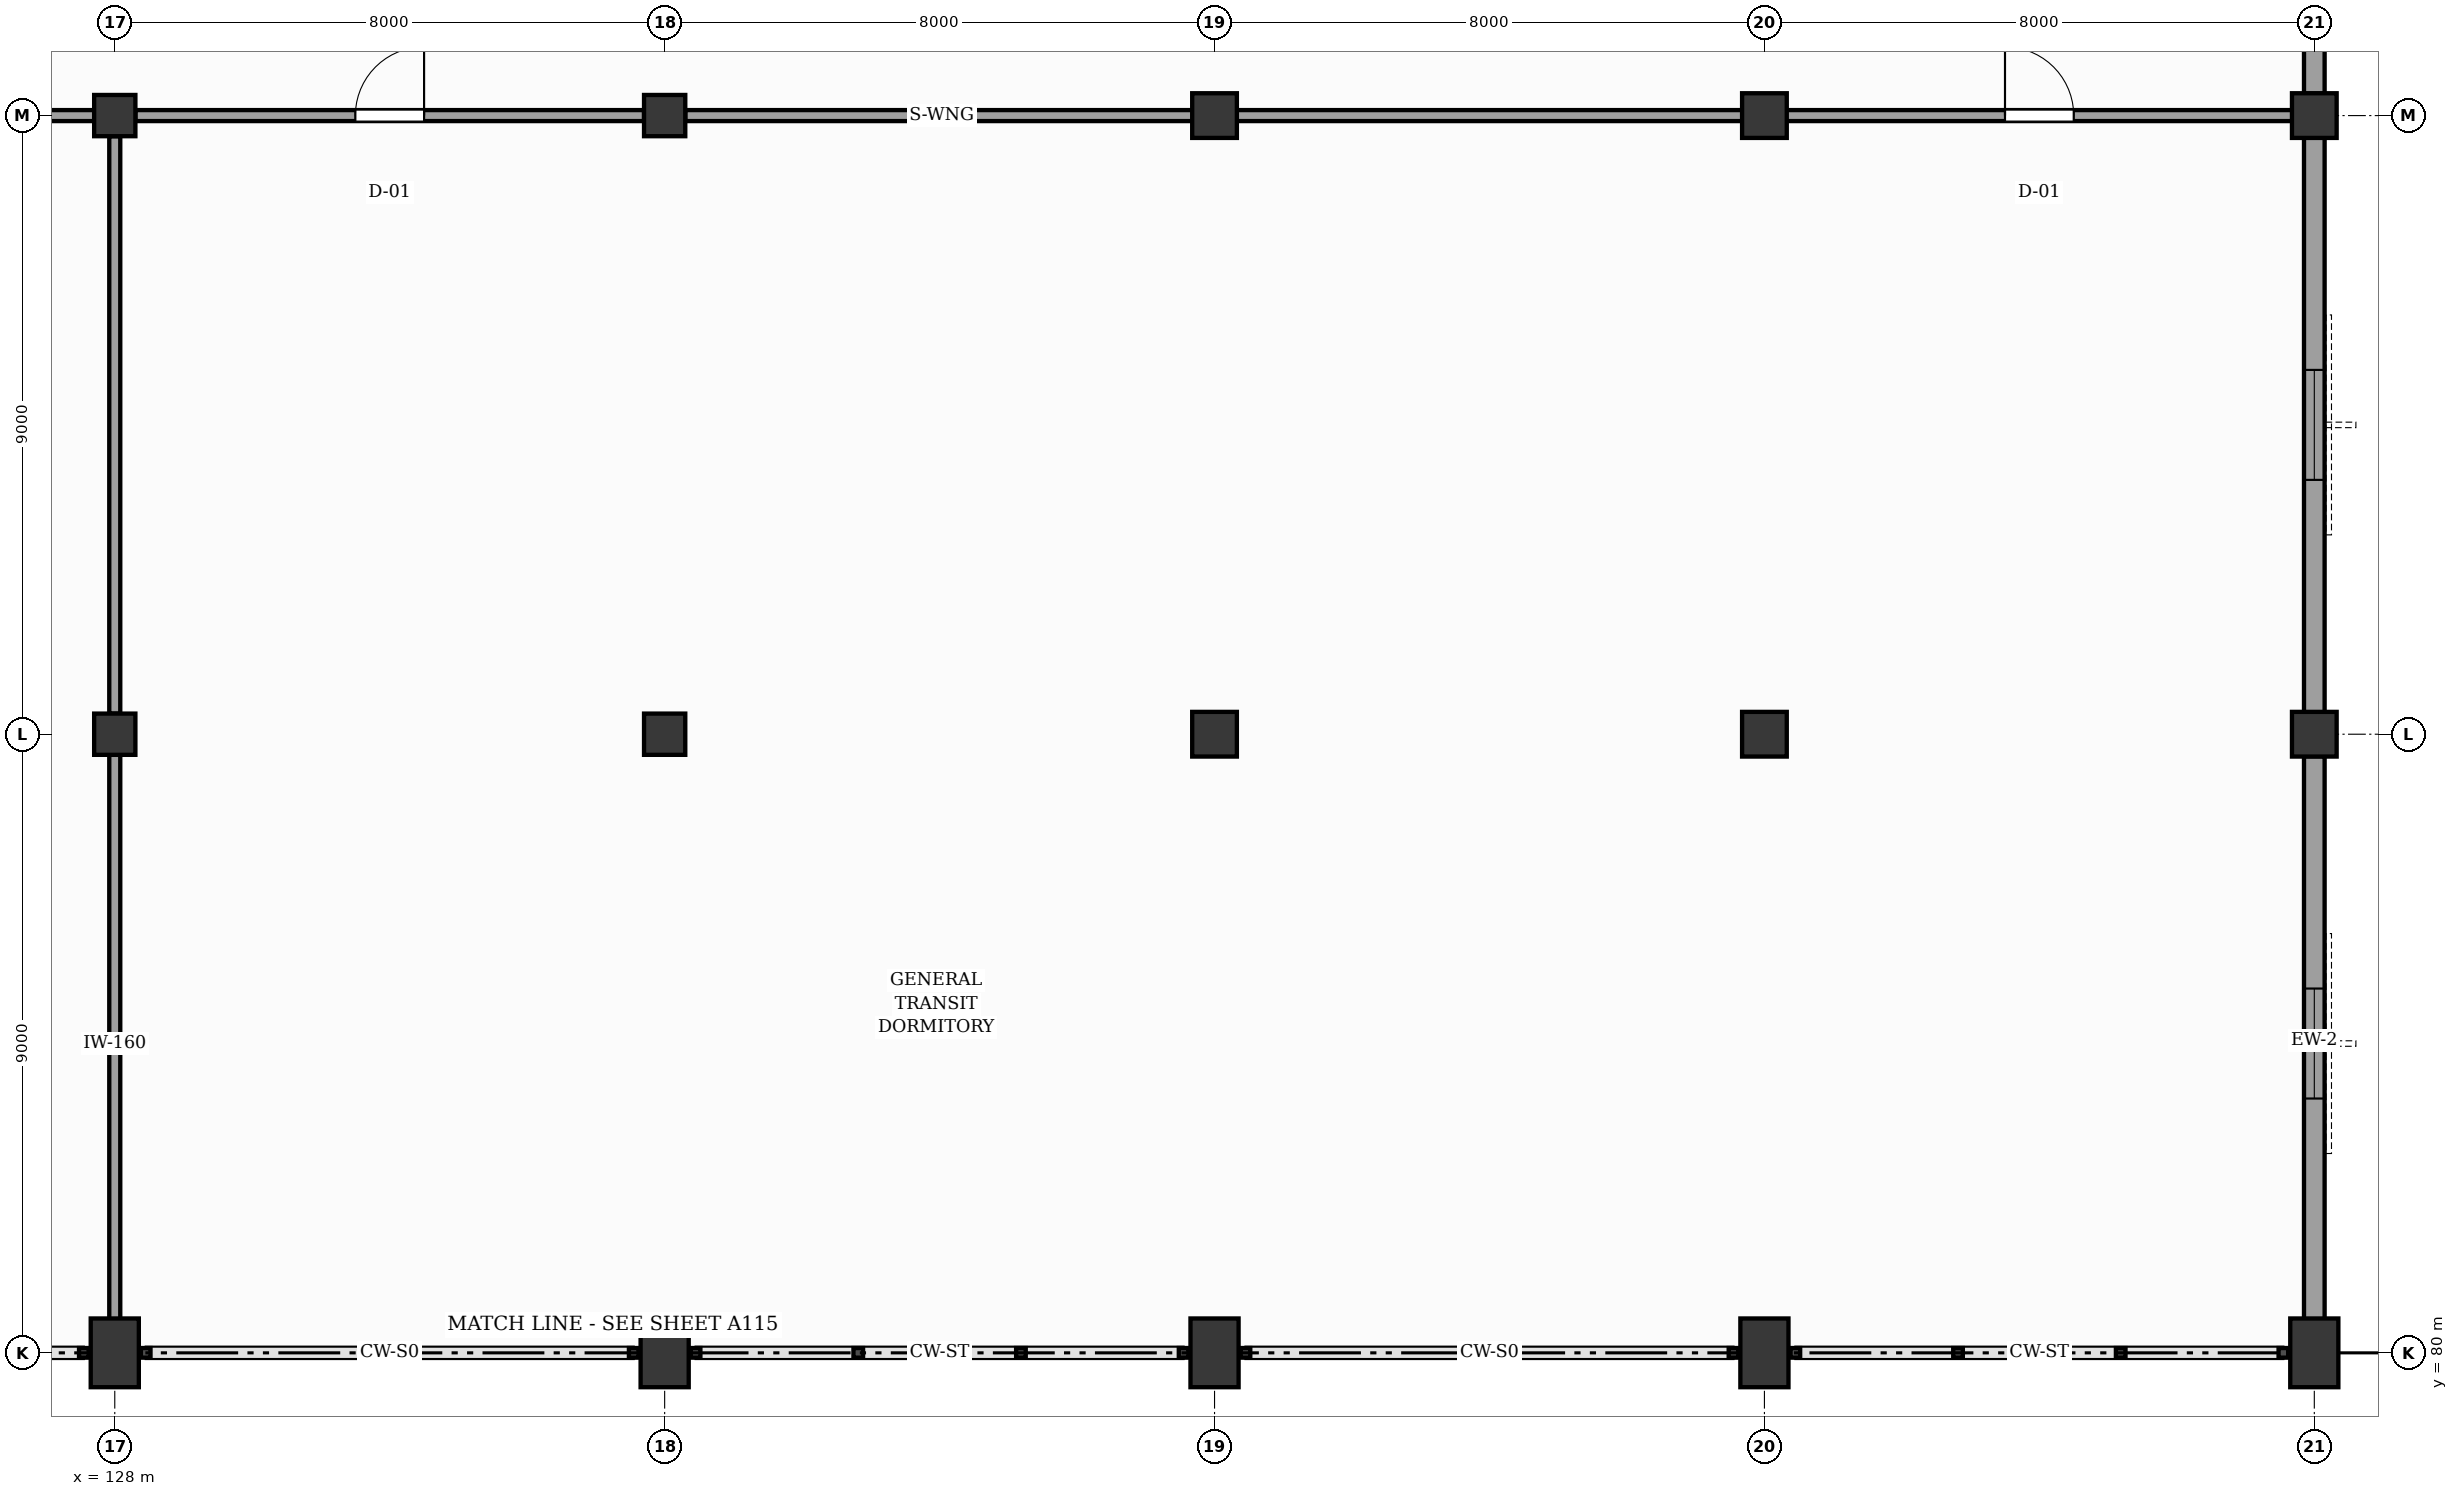
"""IFC4 building model, lengths in metres.
Left out: names, types, materials, properties, quantities, classifications, styles, units other than length and angle.
Written with IfcOpenShell. Run it as: python <this file> out.ifc"""

import sys

from ifc_helpers import new_model, si_unit, direction, frame, frame_2d, origin, origin_2d, place, context, subcontext, project, spatial, rectangle, extrude, element, fill, save


model = new_model("IFC4")
c1 = context("Model", 3, precision=1e-05, world=origin(), true_north=direction((0.0, 1.0)))
c2 = subcontext(c1, "Body", "Model", "MODEL_VIEW")
j1 = project(units=[si_unit("LENGTHUNIT", "METRE"), si_unit("PLANEANGLEUNIT", "RADIAN")], contexts=[c1])
p1 = place(None, origin())
s1 = spatial("IfcSite", under=j1, at=p1, CompositionType="ELEMENT")
p2 = place(p1, origin())
s2 = spatial("IfcBuilding", under=s1, at=p2, CompositionType="ELEMENT")
p3 = place(p2, frame((0.0, 0.0, 4.8)))
s3 = spatial("IfcBuildingStorey", under=s2, at=p3, CompositionType="ELEMENT", Elevation=4.8)
p4 = place(p3, frame((128.0, 80.0, 0.0), z_axis=(0.0, 0.0, 1.0), x_axis=(1.0, 0.0, 0.0)))
e1 = element("IfcColumn", 1, at=p4, inside=s3, PredefinedType="COLUMN", context=c2, shape_type="SweptSolid", body=[
    extrude(rectangle(XDim=0.7, YDim=1.0, at=origin_2d()), origin(), (0.0, 0.0, 1.0), 4.8),
])
for number, where, z_axis, x_axis in (
    (2, (128.0, 89.0, 0.0), (0.0, 0.0, 1.0), (1.0, 0.0, 0.0)),
    (3, (128.0, 98.0, 0.0), (0.0, 0.0, 1.0), (1.0, 0.0, 0.0)),
):
    element("IfcColumn", number, at=place(p3, frame(where, z_axis=z_axis, x_axis=x_axis)), inside=s3, PredefinedType="COLUMN", context=c2, shape_type="SweptSolid", body=[
        extrude(rectangle(XDim=0.6, YDim=0.6, at=origin_2d()), origin(), (0.0, 0.0, 1.0), 4.8),
    ])
p5 = place(p3, frame((136.0, 80.0, 0.0), z_axis=(0.0, 0.0, 1.0), x_axis=(1.0, 0.0, 0.0)))
e4 = element("IfcColumn", 4, at=p5, inside=s3, PredefinedType="COLUMN", context=c2, shape_type="SweptSolid", body=[
    extrude(rectangle(XDim=0.7, YDim=1.0, at=origin_2d()), origin(), (0.0, 0.0, 1.0), 4.8),
])
for number, where, z_axis, x_axis in (
    (5, (136.0, 89.0, 0.0), (0.0, 0.0, 1.0), (1.0, 0.0, 0.0)),
    (6, (136.0, 98.0, 0.0), (0.0, 0.0, 1.0), (1.0, 0.0, 0.0)),
):
    element("IfcColumn", number, at=place(p3, frame(where, z_axis=z_axis, x_axis=x_axis)), inside=s3, PredefinedType="COLUMN", context=c2, shape_type="SweptSolid", body=[
        extrude(rectangle(XDim=0.6, YDim=0.6, at=origin_2d()), origin(), (0.0, 0.0, 1.0), 4.8),
    ])
p6 = place(p3, frame((144.0, 80.0, 0.0), z_axis=(0.0, 0.0, 1.0), x_axis=(1.0, 0.0, 0.0)))
e7 = element("IfcColumn", 7, at=p6, inside=s3, PredefinedType="COLUMN", context=c2, shape_type="SweptSolid", body=[
    extrude(rectangle(XDim=0.7, YDim=1.0, at=origin_2d()), origin(), (0.0, 0.0, 1.0), 4.8),
])
for number, where, z_axis, x_axis in (
    (8, (144.0, 89.0, 0.0), (0.0, 0.0, 1.0), (1.0, 0.0, 0.0)),
    (9, (144.0, 98.0, 0.0), (0.0, 0.0, 1.0), (1.0, 0.0, 0.0)),
):
    element("IfcColumn", number, at=place(p3, frame(where, z_axis=z_axis, x_axis=x_axis)), inside=s3, PredefinedType="COLUMN", context=c2, shape_type="SweptSolid", body=[
        extrude(rectangle(XDim=0.65, YDim=0.65, at=origin_2d()), origin(), (0.0, 0.0, 1.0), 4.8),
    ])
p7 = place(p3, frame((152.0, 80.0, 0.0), z_axis=(0.0, 0.0, 1.0), x_axis=(1.0, 0.0, 0.0)))
e10 = element("IfcColumn", 10, at=p7, inside=s3, PredefinedType="COLUMN", context=c2, shape_type="SweptSolid", body=[
    extrude(rectangle(XDim=0.7, YDim=1.0, at=origin_2d()), origin(), (0.0, 0.0, 1.0), 4.8),
])
for number, where, z_axis, x_axis in (
    (11, (152.0, 89.0, 0.0), (0.0, 0.0, 1.0), (1.0, 0.0, 0.0)),
    (12, (152.0, 98.0, 0.0), (0.0, 0.0, 1.0), (1.0, 0.0, 0.0)),
):
    element("IfcColumn", number, at=place(p3, frame(where, z_axis=z_axis, x_axis=x_axis)), inside=s3, PredefinedType="COLUMN", context=c2, shape_type="SweptSolid", body=[
        extrude(rectangle(XDim=0.65, YDim=0.65, at=origin_2d()), origin(), (0.0, 0.0, 1.0), 4.8),
    ])
p8 = place(p3, frame((160.0, 80.0, 0.0), z_axis=(0.0, 0.0, 1.0), x_axis=(1.0, 0.0, 0.0)))
e13 = element("IfcColumn", 13, at=p8, inside=s3, PredefinedType="COLUMN", context=c2, shape_type="SweptSolid", body=[
    extrude(rectangle(XDim=0.7, YDim=1.0, at=origin_2d()), origin(), (0.0, 0.0, 1.0), 4.8),
])
for number, where, z_axis, x_axis in (
    (14, (160.0, 89.0, 0.0), (0.0, 0.0, 1.0), (1.0, 0.0, 0.0)),
    (15, (160.0, 98.0, 0.0), (0.0, 0.0, 1.0), (1.0, 0.0, 0.0)),
):
    element("IfcColumn", number, at=place(p3, frame(where, z_axis=z_axis, x_axis=x_axis)), inside=s3, PredefinedType="COLUMN", context=c2, shape_type="SweptSolid", body=[
        extrude(rectangle(XDim=0.65, YDim=0.65, at=origin_2d()), origin(), (0.0, 0.0, 1.0), 4.8),
    ])
p9 = place(p3, frame((160.0, 80.4, 0.0), z_axis=(0.0, 0.0, 1.0), x_axis=(0.0, 1.0, 0.0)))
e16 = element("IfcWall", 16, at=p9, inside=s3, PredefinedType="SOLIDWALL", context=c2, shape_type="SweptSolid", body=[
    extrude(rectangle(XDim=8.28, YDim=0.3, at=frame_2d((4.14, 0.0))), origin(), (0.0, 0.0, 1.0), 3.31),
])
p10 = place(p9, frame((3.3, 0.0, 0.95)))
e17 = element("IfcOpeningElement", 17, at=p10, cuts=e16, PredefinedType="OPENING", context=c2, shape_type="SweptSolid", body=[
    extrude(rectangle(XDim=1.6, YDim=2.1, at=frame_2d((0.8, 1.05))), frame((0.0, 0.16, 0.0), z_axis=(0.0, -1.0, 0.0), x_axis=(1.0, 0.0, 0.0)), (0.0, 0.0, 1.0), 0.32),
])
p11 = place(p3, frame((160.0, 89.32, 0.0), z_axis=(0.0, 0.0, 1.0), x_axis=(0.0, 1.0, 0.0)))
e18 = element("IfcWall", 18, at=p11, inside=s3, PredefinedType="SOLIDWALL", context=c2, shape_type="SweptSolid", body=[
    extrude(rectangle(XDim=8.36, YDim=0.3, at=frame_2d((4.18, 0.0))), origin(), (0.0, 0.0, 1.0), 3.71),
])
p12 = place(p11, frame((3.38, 0.0, 0.95)))
e19 = element("IfcOpeningElement", 19, at=p12, cuts=e18, PredefinedType="OPENING", context=c2, shape_type="SweptSolid", body=[
    extrude(rectangle(XDim=1.6, YDim=2.1, at=frame_2d((0.8, 1.05))), frame((0.0, 0.16, 0.0), z_axis=(0.0, -1.0, 0.0), x_axis=(1.0, 0.0, 0.0)), (0.0, 0.0, 1.0), 0.32),
])
p13 = place(p3, frame((160.0, 98.32, 0.0), z_axis=(0.0, 0.0, 1.0), x_axis=(0.0, 1.0, 0.0)))
e20 = element("IfcWall", 20, at=p13, inside=s3, PredefinedType="SOLIDWALL", context=c2, shape_type="SweptSolid", body=[
    extrude(rectangle(XDim=8.36, YDim=0.3, at=frame_2d((4.18, 0.0))), origin(), (0.0, 0.0, 1.0), 3.71),
])
p14 = place(p13, frame((3.38, 0.0, 0.95)))
e21 = element("IfcOpeningElement", 21, at=p14, cuts=e20, PredefinedType="OPENING", context=c2, shape_type="SweptSolid", body=[
    extrude(rectangle(XDim=1.6, YDim=2.1, at=frame_2d((0.8, 1.05))), frame((0.0, 0.16, 0.0), z_axis=(0.0, -1.0, 0.0), x_axis=(1.0, 0.0, 0.0)), (0.0, 0.0, 1.0), 0.32),
])
p15 = place(p3, frame((120.3, 98.0, 0.0), z_axis=(0.0, 0.0, 1.0), x_axis=(1.0, 0.0, 0.0)))
e22 = element("IfcWall", 22, at=p15, inside=s3, PredefinedType="PARTITIONING", context=c2, shape_type="SweptSolid", body=[
    extrude(rectangle(XDim=7.4, YDim=0.16, at=frame_2d((3.7, 0.0))), origin(), (0.0, 0.0, 1.0), 2.88),
])
p16 = place(p15, frame((3.2, 0.0, 0.0)))
e23 = element("IfcOpeningElement", 23, at=p16, cuts=e22, PredefinedType="OPENING", context=c2, shape_type="SweptSolid", body=[
    extrude(rectangle(XDim=1.0, YDim=2.1, at=frame_2d((0.5, 1.05))), frame((0.0, 0.09, 0.0), z_axis=(0.0, -1.0, 0.0), x_axis=(1.0, 0.0, 0.0)), (0.0, 0.0, 1.0), 0.18),
])
p17 = place(p3, frame((128.0, 80.3, 0.0), z_axis=(0.0, 0.0, 1.0), x_axis=(0.0, 1.0, 0.0)))
e24 = element("IfcWall", 24, at=p17, inside=s3, PredefinedType="PARTITIONING", context=c2, shape_type="SweptSolid", body=[
    extrude(rectangle(XDim=8.4, YDim=0.16, at=frame_2d((4.2, 0.0))), origin(), (0.0, 0.0, 1.0), 3.31),
])
p18 = place(p3, frame((128.0, 89.3, 0.0), z_axis=(0.0, 0.0, 1.0), x_axis=(0.0, 1.0, 0.0)))
e25 = element("IfcWall", 25, at=p18, inside=s3, PredefinedType="PARTITIONING", context=c2, shape_type="SweptSolid", body=[
    extrude(rectangle(XDim=8.4, YDim=0.16, at=frame_2d((4.2, 0.0))), origin(), (0.0, 0.0, 1.0), 3.7),
])
p19 = place(p3, frame((128.3, 98.0, 0.0), z_axis=(0.0, 0.0, 1.0), x_axis=(1.0, 0.0, 0.0)))
e26 = element("IfcWall", 26, at=p19, inside=s3, PredefinedType="PARTITIONING", context=c2, shape_type="SweptSolid", body=[
    extrude(rectangle(XDim=7.4, YDim=0.16, at=frame_2d((3.7, 0.0))), origin(), (0.0, 0.0, 1.0), 3.7),
])
p20 = place(p19, frame((3.2, 0.0, 0.0)))
e27 = element("IfcOpeningElement", 27, at=p20, cuts=e26, PredefinedType="OPENING", context=c2, shape_type="SweptSolid", body=[
    extrude(rectangle(XDim=1.0, YDim=2.1, at=frame_2d((0.5, 1.05))), frame((0.0, 0.09, 0.0), z_axis=(0.0, -1.0, 0.0), x_axis=(1.0, 0.0, 0.0)), (0.0, 0.0, 1.0), 0.18),
])
for number, where, z_axis, x_axis in (
    (28, (136.3, 98.0, 0.0), (0.0, 0.0, 1.0), (1.0, 0.0, 0.0)),
    (29, (144.3, 98.0, 0.0), (0.0, 0.0, 1.0), (1.0, 0.0, 0.0)),
):
    element("IfcWall", number, at=place(p3, frame(where, z_axis=z_axis, x_axis=x_axis)), inside=s3, PredefinedType="PARTITIONING", context=c2, shape_type="SweptSolid", body=[
        extrude(rectangle(XDim=7.4, YDim=0.16, at=frame_2d((3.7, 0.0))), origin(), (0.0, 0.0, 1.0), 3.7),
    ])
p21 = place(p3, frame((152.3, 98.0, 0.0), z_axis=(0.0, 0.0, 1.0), x_axis=(1.0, 0.0, 0.0)))
e30 = element("IfcWall", 30, at=p21, inside=s3, PredefinedType="PARTITIONING", context=c2, shape_type="SweptSolid", body=[
    extrude(rectangle(XDim=7.4, YDim=0.16, at=frame_2d((3.7, 0.0))), origin(), (0.0, 0.0, 1.0), 3.7),
])
p22 = place(p21, frame((3.2, 0.0, 0.0)))
e31 = element("IfcOpeningElement", 31, at=p22, cuts=e30, PredefinedType="OPENING", context=c2, shape_type="SweptSolid", body=[
    extrude(rectangle(XDim=1.0, YDim=2.1, at=frame_2d((0.5, 1.05))), frame((0.0, 0.09, 0.0), z_axis=(0.0, -1.0, 0.0), x_axis=(1.0, 0.0, 0.0)), (0.0, 0.0, 1.0), 0.18),
])
p23 = place(p10, origin())
e32 = element("IfcWindow", 32, at=p23, inside=s3, PartitioningType="SINGLE_PANEL", PredefinedType="WINDOW", context=c2, shape_type="SweptSolid", body=[
    extrude(rectangle(XDim=1.6, YDim=2.1, at=frame_2d((0.8, 1.05))), frame((0.0, 0.03, 0.0), z_axis=(0.0, -1.0, 0.0), x_axis=(1.0, 0.0, 0.0)), (0.0, 0.0, 1.0), 0.06),
])
fill(e17, e32)
p24 = place(p12, origin())
e33 = element("IfcWindow", 33, at=p24, inside=s3, PartitioningType="SINGLE_PANEL", PredefinedType="WINDOW", context=c2, shape_type="SweptSolid", body=[
    extrude(rectangle(XDim=1.6, YDim=2.1, at=frame_2d((0.8, 1.05))), frame((0.0, 0.03, 0.0), z_axis=(0.0, -1.0, 0.0), x_axis=(1.0, 0.0, 0.0)), (0.0, 0.0, 1.0), 0.06),
])
fill(e19, e33)
p25 = place(p20, origin())
e34 = element("IfcDoor", 34, at=p25, inside=s3, OperationType="SINGLE_SWING_RIGHT", PredefinedType="DOOR", context=c2, shape_type="SweptSolid", body=[
    extrude(rectangle(XDim=1.0, YDim=2.1, at=frame_2d((0.5, 1.05))), frame((0.0, 0.025, 0.0), z_axis=(0.0, -1.0, 0.0), x_axis=(1.0, 0.0, 0.0)), (0.0, 0.0, 1.0), 0.05),
])
fill(e27, e34)
p26 = place(p22, origin())
e35 = element("IfcDoor", 35, at=p26, inside=s3, OperationType="SINGLE_SWING_LEFT", PredefinedType="DOOR", context=c2, shape_type="SweptSolid", body=[
    extrude(rectangle(XDim=1.0, YDim=2.1, at=frame_2d((0.5, 1.05))), frame((0.0, 0.025, 0.0), z_axis=(0.0, -1.0, 0.0), x_axis=(1.0, 0.0, 0.0)), (0.0, 0.0, 1.0), 0.05),
])
fill(e31, e35)
save(model, sys.argv[1])
